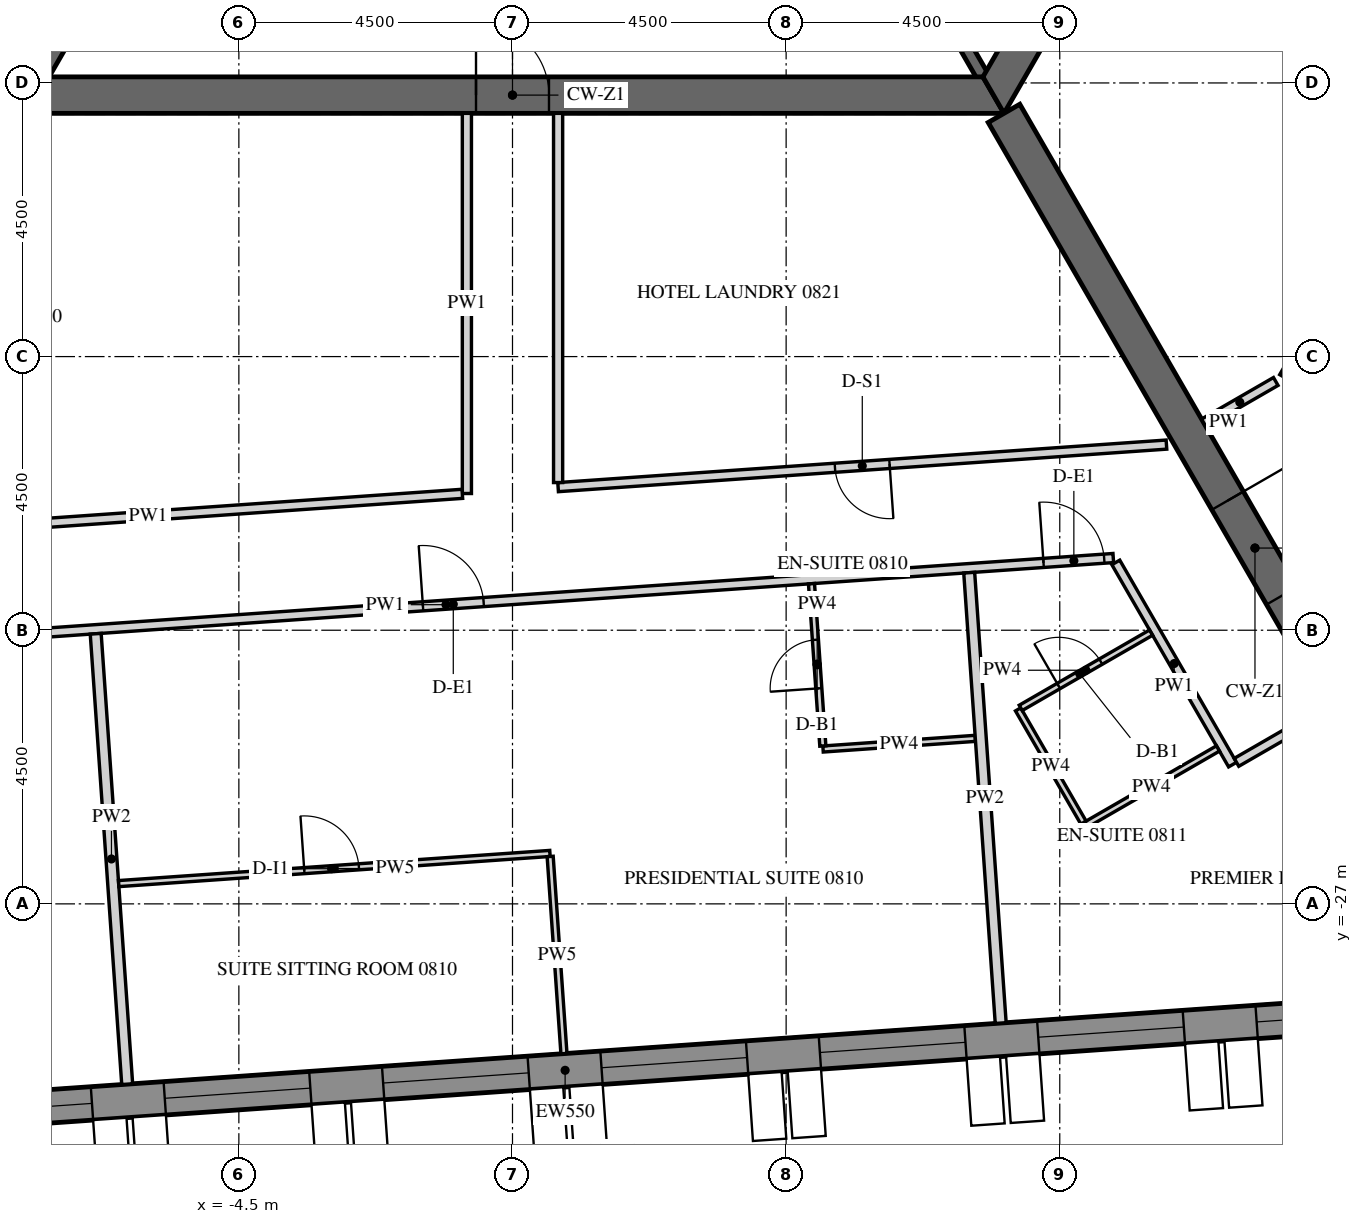
"""IFC4 building model, lengths in metres.
Left out: names, types, materials, properties, quantities, classifications, styles, units other than length and angle.
Written with IfcOpenShell. Run it as: python <this file> out.ifc"""

import sys

from ifc_helpers import new_model, si_unit, direction, frame, frame_2d, origin, place, context, subcontext, project, spatial, polyline, rectangle, outline, extrude, element, fill, save


model = new_model("IFC4")
c1 = context("Model", 3, precision=1e-05, world=origin(), true_north=direction((0.0, 1.0)))
c2 = subcontext(c1, "Body", "Model", "MODEL_VIEW")
j1 = project(units=[si_unit("LENGTHUNIT", "METRE"), si_unit("PLANEANGLEUNIT", "RADIAN")], contexts=[c1])
p1 = place(None, origin())
s1 = spatial("IfcSite", under=j1, at=p1, CompositionType="ELEMENT")
p2 = place(p1, origin())
s2 = spatial("IfcBuilding", under=s1, at=p2, CompositionType="ELEMENT")
p3 = place(p2, frame((0.0, 0.0, 111.6)))
s3 = spatial("IfcBuildingStorey", under=s2, at=p3, CompositionType="ELEMENT", Elevation=111.6)
p4 = place(p3, frame((-14.134, -30.786, -0.15), z_axis=(0.0, 0.0, 1.0), x_axis=(0.997564037441, 0.069756657061, 0.0)))
e1 = element("IfcWall", 1, at=p4, inside=s3, PredefinedType="SOLIDWALL", context=c2, shape_type="SweptSolid", body=[
    extrude(outline(polyline([(-0.026, -0.275), (30.094, -0.275), (30.049, 0.275), (0.026, 0.275), (-0.026, -0.275)])), origin(), (0.0, 0.0, 1.0), 3.9),
])
p5 = place(p4, frame((1.236, 0.0, 1.05)))
e2 = element("IfcOpeningElement", 2, at=p5, cuts=e1, PredefinedType="OPENING", context=c2, shape_type="SweptSolid", body=[
    extrude(rectangle(XDim=2.4, YDim=2.4, at=frame_2d((1.2, 1.2))), frame((0.0, 0.285, 0.0), z_axis=(0.0, -1.0, 0.0), x_axis=(1.0, 0.0, 0.0)), (0.0, 0.0, 1.0), 0.57),
])
p6 = place(p4, frame((4.835, 0.0, 1.05)))
e3 = element("IfcOpeningElement", 3, at=p6, cuts=e1, PredefinedType="OPENING", context=c2, shape_type="SweptSolid", body=[
    extrude(rectangle(XDim=2.4, YDim=2.4, at=frame_2d((1.2, 1.2))), frame((0.0, 0.285, 0.0), z_axis=(0.0, -1.0, 0.0), x_axis=(1.0, 0.0, 0.0)), (0.0, 0.0, 1.0), 0.57),
])
p7 = place(p4, frame((8.436, 0.0, 1.05)))
e4 = element("IfcOpeningElement", 4, at=p7, cuts=e1, PredefinedType="OPENING", context=c2, shape_type="SweptSolid", body=[
    extrude(rectangle(XDim=2.4, YDim=2.4, at=frame_2d((1.2, 1.2))), frame((0.0, 0.285, 0.0), z_axis=(0.0, -1.0, 0.0), x_axis=(1.0, 0.0, 0.0)), (0.0, 0.0, 1.0), 0.57),
])
p8 = place(p4, frame((12.035, 0.0, 1.05)))
e5 = element("IfcOpeningElement", 5, at=p8, cuts=e1, PredefinedType="OPENING", context=c2, shape_type="SweptSolid", body=[
    extrude(rectangle(XDim=2.4, YDim=2.4, at=frame_2d((1.2, 1.2))), frame((0.0, 0.285, 0.0), z_axis=(0.0, -1.0, 0.0), x_axis=(1.0, 0.0, 0.0)), (0.0, 0.0, 1.0), 0.57),
])
p9 = place(p4, frame((15.635, 0.0, 1.05)))
e6 = element("IfcOpeningElement", 6, at=p9, cuts=e1, PredefinedType="OPENING", context=c2, shape_type="SweptSolid", body=[
    extrude(rectangle(XDim=2.4, YDim=2.4, at=frame_2d((1.2, 1.2))), frame((0.0, 0.285, 0.0), z_axis=(0.0, -1.0, 0.0), x_axis=(1.0, 0.0, 0.0)), (0.0, 0.0, 1.0), 0.57),
])
p10 = place(p4, frame((19.236, 0.0, 1.05)))
e7 = element("IfcOpeningElement", 7, at=p10, cuts=e1, PredefinedType="OPENING", context=c2, shape_type="SweptSolid", body=[
    extrude(rectangle(XDim=2.4, YDim=2.4, at=frame_2d((1.2, 1.2))), frame((0.0, 0.285, 0.0), z_axis=(0.0, -1.0, 0.0), x_axis=(1.0, 0.0, 0.0)), (0.0, 0.0, 1.0), 0.57),
])
p11 = place(p4, frame((22.835, 0.0, 1.05)))
e8 = element("IfcOpeningElement", 8, at=p11, cuts=e1, PredefinedType="OPENING", context=c2, shape_type="SweptSolid", body=[
    extrude(rectangle(XDim=2.4, YDim=2.4, at=frame_2d((1.2, 1.2))), frame((0.0, 0.285, 0.0), z_axis=(0.0, -1.0, 0.0), x_axis=(1.0, 0.0, 0.0)), (0.0, 0.0, 1.0), 0.57),
])
p12 = place(p4, frame((26.436, 0.0, 1.05)))
e9 = element("IfcOpeningElement", 9, at=p12, cuts=e1, PredefinedType="OPENING", context=c2, shape_type="SweptSolid", body=[
    extrude(rectangle(XDim=2.4, YDim=2.4, at=frame_2d((1.2, 1.2))), frame((0.0, 0.285, 0.0), z_axis=(0.0, -1.0, 0.0), x_axis=(1.0, 0.0, 0.0)), (0.0, 0.0, 1.0), 0.57),
])
p13 = place(p3, frame((-7.91, -13.7, -0.15), z_axis=(0.0, 0.0, 1.0), x_axis=(1.0, 0.0, 0.0)))
e10 = element("IfcWall", 10, at=p13, inside=s3, PredefinedType="SHEAR", context=c2, shape_type="SweptSolid", body=[
    extrude(outline(polyline([(-0.173, -0.3), (15.993, -0.3), (15.646, 0.3), (0.173, 0.3), (-0.173, -0.3)])), origin(), (0.0, 0.0, 1.0), 3.9),
])
p14 = place(p13, frame((7.31, 0.0, 0.15)))
e11 = element("IfcOpeningElement", 11, at=p14, cuts=e10, PredefinedType="OPENING", context=c2, shape_type="SweptSolid", body=[
    extrude(rectangle(XDim=1.2, YDim=2.4, at=frame_2d((0.6, 1.2))), frame((0.0, 0.31, 0.0), z_axis=(0.0, -1.0, 0.0), x_axis=(1.0, 0.0, 0.0)), (0.0, 0.0, 1.0), 0.62),
])
p15 = place(p3, frame((7.91, -13.7, -0.15), z_axis=(0.0, 0.0, 1.0), x_axis=(0.499999880136, 0.866025472988, 0.0)))
e12 = element("IfcWall", 12, at=p15, inside=s3, PredefinedType="SHEAR", context=c2, shape_type="SweptSolid", body=[
    extrude(outline(polyline([(-0.173, -0.3), (15.993, -0.3), (15.646, 0.3), (0.173, 0.3), (-0.173, -0.3)])), origin(), (0.0, 0.0, 1.0), 3.9),
])
p16 = place(p15, frame((7.039, 0.0, 0.15)))
e13 = element("IfcOpeningElement", 13, at=p16, cuts=e12, PredefinedType="OPENING", context=c2, shape_type="SweptSolid", body=[
    extrude(rectangle(XDim=1.8, YDim=2.4, at=frame_2d((0.9, 1.2))), frame((0.0, 0.31, 0.0), z_axis=(0.0, -1.0, 0.0), x_axis=(1.0, 0.0, 0.0)), (0.0, 0.0, 1.0), 0.62),
])
p17 = place(p3, frame((8.083, -14.0, -0.15), z_axis=(0.0, 0.0, 1.0), x_axis=(0.499997680643, -0.866026742862, 0.0)))
e14 = element("IfcWall", 14, at=p17, inside=s3, PredefinedType="SHEAR", context=c2, shape_type="SweptSolid", body=[
    extrude(rectangle(XDim=16.509, YDim=0.6, at=frame_2d((8.254, 0.0))), origin(), (0.0, 0.0, 1.0), 3.9),
])
p18 = place(p17, frame((7.354, 0.0, 0.15)))
e15 = element("IfcOpeningElement", 15, at=p18, cuts=e14, PredefinedType="OPENING", context=c2, shape_type="SweptSolid", body=[
    extrude(rectangle(XDim=1.8, YDim=2.4, at=frame_2d((0.9, 1.2))), frame((0.0, 0.31, 0.0), z_axis=(0.0, -1.0, 0.0), x_axis=(1.0, 0.0, 0.0)), (0.0, 0.0, 1.0), 0.62),
])
for number, where, z_axis, x_axis in (
    (16, (-5.773, -10.0, -0.15), (0.0, 0.0, 1.0), (-0.5, -0.866, 0.0)),
    (17, (5.773, -10.0, -0.15), (0.0, 0.0, 1.0), (0.5, -0.866, 0.0)),
):
    element("IfcWall", number, at=place(p3, frame(where, z_axis=z_axis, x_axis=x_axis)), inside=s3, PredefinedType="SHEAR", context=c2, shape_type="SweptSolid", body=[
        extrude(rectangle(XDim=3.926, YDim=0.2, at=frame_2d((1.963, 0.0))), origin(), (0.0, 0.0, 1.0), 3.9),
    ])
p19 = place(p3, frame((-12.068, -22.847, 0.0), z_axis=(0.0, 0.0, 1.0), x_axis=(0.99756437486, 0.069751831595, 0.0)))
e18 = element("IfcWall", 18, at=p19, inside=s3, PredefinedType="PARTITIONING", context=c2, shape_type="SweptSolid", body=[
    extrude(rectangle(XDim=22.002, YDim=0.15, at=frame_2d((11.001, 0.0))), origin(), (0.0, 0.0, 1.0), 2.988),
])
p20 = place(p19, frame((10.621, 0.0, 0.0)))
e19 = element("IfcOpeningElement", 19, at=p20, cuts=e18, PredefinedType="OPENING", context=c2, shape_type="SweptSolid", body=[
    extrude(rectangle(XDim=1.0, YDim=2.1, at=frame_2d((0.5, 1.05))), frame((0.0, 0.085, 0.0), z_axis=(0.0, -1.0, 0.0), x_axis=(1.0, 0.0, 0.0)), (0.0, 0.0, 1.0), 0.17),
])
p21 = place(p19, frame((20.852, 0.0, 0.0)))
e20 = element("IfcOpeningElement", 20, at=p21, cuts=e18, PredefinedType="OPENING", context=c2, shape_type="SweptSolid", body=[
    extrude(rectangle(XDim=1.0, YDim=2.1, at=frame_2d((0.5, 1.05))), frame((0.0, 0.085, 0.0), z_axis=(0.0, -1.0, 0.0), x_axis=(1.0, 0.0, 0.0)), (0.0, 0.0, 1.0), 0.17),
])
p22 = place(p3, frame((9.922, -21.385, 0.0), z_axis=(0.0, 0.0, 1.0), x_axis=(0.500023335103, -0.866011930837, 0.0)))
e21 = element("IfcWall", 21, at=p22, inside=s3, PredefinedType="PARTITIONING", context=c2, shape_type="SweptSolid", body=[
    extrude(rectangle(XDim=3.84, YDim=0.15, at=frame_2d((1.92, 0.0))), origin(), (0.0, 0.0, 1.0), 2.988),
])
p23 = place(p3, frame((11.906, -24.673, 0.0), z_axis=(0.0, 0.0, 1.0), x_axis=(0.866013532718, 0.500020560727, 0.0)))
e22 = element("IfcWall", 22, at=p23, inside=s3, PredefinedType="PARTITIONING", context=c2, shape_type="SweptSolid", body=[
    extrude(rectangle(XDim=1.725, YDim=0.15, at=frame_2d((0.863, 0.0))), origin(), (0.0, 0.0, 1.0), 2.988),
])
p24 = place(p3, frame((-0.75, -14.0, 0.0), z_axis=(0.0, 0.0, 1.0), x_axis=(0.0, -1.0, 0.0)))
e23 = element("IfcWall", 23, at=p24, inside=s3, PredefinedType="PARTITIONING", context=c2, shape_type="SweptSolid", body=[
    extrude(rectangle(XDim=6.252, YDim=0.15, at=frame_2d((3.126, 0.0))), origin(), (0.0, 0.0, 1.0), 2.988),
])
p25 = place(p3, frame((-0.825, -20.257, 0.0), z_axis=(0.0, 0.0, 1.0), x_axis=(-0.9975635143, -0.069764137903, 0.0)))
e24 = element("IfcWall", 24, at=p25, inside=s3, PredefinedType="PARTITIONING", context=c2, shape_type="SweptSolid", body=[
    extrude(rectangle(XDim=10.355, YDim=0.15, at=frame_2d((5.177, 0.0))), origin(), (0.0, 0.0, 1.0), 2.988),
])
p26 = place(p3, frame((10.754, -19.447, 0.0), z_axis=(0.0, 0.0, 1.0), x_axis=(-0.997564830966, -0.069745308232, 0.0)))
e25 = element("IfcWall", 25, at=p26, inside=s3, PredefinedType="PARTITIONING", context=c2, shape_type="SweptSolid", body=[
    extrude(rectangle(XDim=10.029, YDim=0.15, at=frame_2d((5.014, 0.0))), origin(), (0.0, 0.0, 1.0), 2.988),
])
p27 = place(p26, frame((4.564, 0.0, 0.0)))
e26 = element("IfcOpeningElement", 26, at=p27, cuts=e25, PredefinedType="OPENING", context=c2, shape_type="SweptSolid", body=[
    extrude(rectangle(XDim=0.9, YDim=2.1, at=frame_2d((0.45, 1.05))), frame((0.0, 0.085, 0.0), z_axis=(0.0, -1.0, 0.0), x_axis=(1.0, 0.0, 0.0)), (0.0, 0.0, 1.0), 0.17),
])
p28 = place(p3, frame((0.75, -20.072, 0.0), z_axis=(0.0, 0.0, 1.0), x_axis=(0.0, 1.0, 0.0)))
e27 = element("IfcWall", 27, at=p28, inside=s3, PredefinedType="PARTITIONING", context=c2, shape_type="SweptSolid", body=[
    extrude(rectangle(XDim=6.072, YDim=0.15, at=frame_2d((3.036, 0.0))), origin(), (0.0, 0.0, 1.0), 2.988),
])
p29 = place(p3, frame((16.902, -11.024, 0.0), z_axis=(0.0, 0.0, 1.0), x_axis=(-0.499999527968, -0.866025676312, 0.0)))
e28 = element("IfcWall", 28, at=p29, inside=s3, PredefinedType="PARTITIONING", context=c2, shape_type="SweptSolid", body=[
    extrude(rectangle(XDim=8.441, YDim=0.15, at=frame_2d((4.22, 0.0))), origin(), (0.0, 0.0, 1.0), 2.988),
])
p30 = place(p29, frame((3.771, 0.0, 0.0)))
e29 = element("IfcOpeningElement", 29, at=p30, cuts=e28, PredefinedType="OPENING", context=c2, shape_type="SweptSolid", body=[
    extrude(rectangle(XDim=0.9, YDim=2.1, at=frame_2d((0.45, 1.05))), frame((0.0, 0.085, 0.0), z_axis=(0.0, -1.0, 0.0), x_axis=(1.0, 0.0, 0.0)), (0.0, 0.0, 1.0), 0.17),
])
p31 = place(p3, frame((12.552, -18.409, 0.0), z_axis=(0.0, 0.0, 1.0), x_axis=(-0.866078408764, -0.499908181442, 0.0)))
e30 = element("IfcWall", 30, at=p31, inside=s3, PredefinedType="PARTITIONING", context=c2, shape_type="SweptSolid", body=[
    extrude(rectangle(XDim=1.365, YDim=0.15, at=frame_2d((0.683, 0.0))), origin(), (0.0, 0.0, 1.0), 2.988),
])
p32 = place(p3, frame((-6.336, -29.965, 0.0), z_axis=(0.0, 0.0, 1.0), x_axis=(-0.06977252161, 0.997562927954, 0.0)))
e31 = element("IfcWall", 31, at=p32, inside=s3, PredefinedType="PARTITIONING", context=c2, shape_type="SweptSolid", body=[
    extrude(rectangle(XDim=7.425, YDim=0.18, at=frame_2d((3.712, 0.0))), origin(), (0.0, 0.0, 1.0), 2.988),
])
p33 = place(p3, frame((7.611, -24.278, 0.0), z_axis=(0.0, 0.0, 1.0), x_axis=(-0.997565196586, -0.069740078583, 0.0)))
e32 = element("IfcWall", 32, at=p33, inside=s3, PredefinedType="PARTITIONING", context=c2, shape_type="SweptSolid", body=[
    extrude(rectangle(XDim=2.51, YDim=0.1, at=frame_2d((1.255, 0.0))), origin(), (0.0, 0.0, 1.0), 2.988),
])
p34 = place(p3, frame((5.104, -24.403, 0.0), z_axis=(0.0, 0.0, 1.0), x_axis=(-0.069729221413, 0.997565955554, 0.0)))
e33 = element("IfcWall", 33, at=p34, inside=s3, PredefinedType="PARTITIONING", context=c2, shape_type="SweptSolid", body=[
    extrude(rectangle(XDim=2.675, YDim=0.1, at=frame_2d((1.337, 0.0))), origin(), (0.0, 0.0, 1.0), 2.988),
])
p35 = place(p34, frame((0.95, 0.0, 0.0)))
e34 = element("IfcOpeningElement", 34, at=p35, cuts=e33, PredefinedType="OPENING", context=c2, shape_type="SweptSolid", body=[
    extrude(rectangle(XDim=0.8, YDim=2.1, at=frame_2d((0.4, 1.05))), frame((0.0, 0.06, 0.0), z_axis=(0.0, -1.0, 0.0), x_axis=(1.0, 0.0, 0.0)), (0.0, 0.0, 1.0), 0.12),
])
p36 = place(p3, frame((-6.477, -26.667, 0.0), z_axis=(0.0, 0.0, 1.0), x_axis=(0.997565277642, 0.069738919141, 0.0)))
e35 = element("IfcWall", 35, at=p36, inside=s3, PredefinedType="PARTITIONING", context=c2, shape_type="SweptSolid", body=[
    extrude(rectangle(XDim=7.11, YDim=0.1, at=frame_2d((3.555, 0.0))), origin(), (0.0, 0.0, 1.0), 2.988),
])
p37 = place(p36, frame((3.06, 0.0, 0.0)))
e36 = element("IfcOpeningElement", 36, at=p37, cuts=e35, PredefinedType="OPENING", context=c2, shape_type="SweptSolid", body=[
    extrude(rectangle(XDim=0.9, YDim=2.1, at=frame_2d((0.45, 1.05))), frame((0.0, 0.06, 0.0), z_axis=(0.0, -1.0, 0.0), x_axis=(1.0, 0.0, 0.0)), (0.0, 0.0, 1.0), 0.12),
])
p38 = place(p3, frame((0.619, -26.221, 0.0), z_axis=(0.0, 0.0, 1.0), x_axis=(0.069789506462, -0.997561739838, 0.0)))
e37 = element("IfcWall", 37, at=p38, inside=s3, PredefinedType="PARTITIONING", context=c2, shape_type="SweptSolid", body=[
    extrude(rectangle(XDim=3.25, YDim=0.1, at=frame_2d((1.625, 0.0))), origin(), (0.0, 0.0, 1.0), 2.988),
])
p39 = place(p3, frame((8.029, -28.96, 0.0), z_axis=(0.0, 0.0, 1.0), x_axis=(-0.069739801019, 0.99756521599, 0.0)))
e38 = element("IfcWall", 38, at=p39, inside=s3, PredefinedType="PARTITIONING", context=c2, shape_type="SweptSolid", body=[
    extrude(rectangle(XDim=7.425, YDim=0.18, at=frame_2d((3.712, 0.0))), origin(), (0.0, 0.0, 1.0), 2.988),
])
p40 = place(p3, frame((11.602, -24.445, 0.0), z_axis=(0.0, 0.0, 1.0), x_axis=(-0.866039067339, -0.499976333282, 0.0)))
e39 = element("IfcWall", 39, at=p40, inside=s3, PredefinedType="PARTITIONING", context=c2, shape_type="SweptSolid", body=[
    extrude(rectangle(XDim=2.525, YDim=0.1, at=frame_2d((1.262, 0.0))), origin(), (0.0, 0.0, 1.0), 2.988),
])
p41 = place(p3, frame((9.39, -25.664, 0.0), z_axis=(0.0, 0.0, 1.0), x_axis=(-0.500010803666, 0.866019166195, 0.0)))
e40 = element("IfcWall", 40, at=p41, inside=s3, PredefinedType="PARTITIONING", context=c2, shape_type="SweptSolid", body=[
    extrude(rectangle(XDim=2.15, YDim=0.1, at=frame_2d((1.075, 0.0))), origin(), (0.0, 0.0, 1.0), 2.988),
])
p42 = place(p3, frame((8.358, -23.777, 0.0), z_axis=(0.0, 0.0, 1.0), x_axis=(0.86604923931, 0.499958713387, 0.0)))
e41 = element("IfcWall", 41, at=p42, inside=s3, PredefinedType="PARTITIONING", context=c2, shape_type="SweptSolid", body=[
    extrude(rectangle(XDim=2.475, YDim=0.1, at=frame_2d((1.237, 0.0))), origin(), (0.0, 0.0, 1.0), 2.988),
])
p43 = place(p42, frame((0.72, 0.0, 0.0)))
e42 = element("IfcOpeningElement", 42, at=p43, cuts=e41, PredefinedType="OPENING", context=c2, shape_type="SweptSolid", body=[
    extrude(rectangle(XDim=0.8, YDim=2.1, at=frame_2d((0.4, 1.05))), frame((0.0, 0.06, 0.0), z_axis=(0.0, -1.0, 0.0), x_axis=(1.0, 0.0, 0.0)), (0.0, 0.0, 1.0), 0.12),
])
p44 = place(p6, frame((0.0, 0.205, 0.0)))
e43 = element("IfcWindow", 43, at=p44, inside=s3, PartitioningType="DOUBLE_PANEL_VERTICAL", PredefinedType="WINDOW", context=c2, shape_type="SweptSolid", body=[
    extrude(rectangle(XDim=2.4, YDim=2.4, at=frame_2d((1.2, 1.2))), frame((0.0, 0.03, 0.0), z_axis=(0.0, -1.0, 0.0), x_axis=(1.0, 0.0, 0.0)), (0.0, 0.0, 1.0), 0.06),
])
fill(e3, e43)
p45 = place(p7, frame((0.0, 0.205, 0.0)))
e44 = element("IfcWindow", 44, at=p45, inside=s3, PartitioningType="DOUBLE_PANEL_VERTICAL", PredefinedType="WINDOW", context=c2, shape_type="SweptSolid", body=[
    extrude(rectangle(XDim=2.4, YDim=2.4, at=frame_2d((1.2, 1.2))), frame((0.0, 0.03, 0.0), z_axis=(0.0, -1.0, 0.0), x_axis=(1.0, 0.0, 0.0)), (0.0, 0.0, 1.0), 0.06),
])
fill(e4, e44)
p46 = place(p8, frame((0.0, 0.205, 0.0)))
e45 = element("IfcWindow", 45, at=p46, inside=s3, PartitioningType="DOUBLE_PANEL_VERTICAL", PredefinedType="WINDOW", context=c2, shape_type="SweptSolid", body=[
    extrude(rectangle(XDim=2.4, YDim=2.4, at=frame_2d((1.2, 1.2))), frame((0.0, 0.03, 0.0), z_axis=(0.0, -1.0, 0.0), x_axis=(1.0, 0.0, 0.0)), (0.0, 0.0, 1.0), 0.06),
])
fill(e5, e45)
p47 = place(p9, frame((0.0, 0.205, 0.0)))
e46 = element("IfcWindow", 46, at=p47, inside=s3, PartitioningType="DOUBLE_PANEL_VERTICAL", PredefinedType="WINDOW", context=c2, shape_type="SweptSolid", body=[
    extrude(rectangle(XDim=2.4, YDim=2.4, at=frame_2d((1.2, 1.2))), frame((0.0, 0.03, 0.0), z_axis=(0.0, -1.0, 0.0), x_axis=(1.0, 0.0, 0.0)), (0.0, 0.0, 1.0), 0.06),
])
fill(e6, e46)
p48 = place(p10, frame((0.0, 0.205, 0.0)))
e47 = element("IfcWindow", 47, at=p48, inside=s3, PartitioningType="DOUBLE_PANEL_VERTICAL", PredefinedType="WINDOW", context=c2, shape_type="SweptSolid", body=[
    extrude(rectangle(XDim=2.4, YDim=2.4, at=frame_2d((1.2, 1.2))), frame((0.0, 0.03, 0.0), z_axis=(0.0, -1.0, 0.0), x_axis=(1.0, 0.0, 0.0)), (0.0, 0.0, 1.0), 0.06),
])
fill(e7, e47)
p49 = place(p11, frame((0.0, 0.205, 0.0)))
e48 = element("IfcWindow", 48, at=p49, inside=s3, PartitioningType="DOUBLE_PANEL_VERTICAL", PredefinedType="WINDOW", context=c2, shape_type="SweptSolid", body=[
    extrude(rectangle(XDim=2.4, YDim=2.4, at=frame_2d((1.2, 1.2))), frame((0.0, 0.03, 0.0), z_axis=(0.0, -1.0, 0.0), x_axis=(1.0, 0.0, 0.0)), (0.0, 0.0, 1.0), 0.06),
])
fill(e8, e48)
p50 = place(p12, frame((0.0, 0.205, 0.0)))
e49 = element("IfcWindow", 49, at=p50, inside=s3, PartitioningType="DOUBLE_PANEL_VERTICAL", PredefinedType="WINDOW", context=c2, shape_type="SweptSolid", body=[
    extrude(rectangle(XDim=2.4, YDim=2.4, at=frame_2d((1.2, 1.2))), frame((0.0, 0.03, 0.0), z_axis=(0.0, -1.0, 0.0), x_axis=(1.0, 0.0, 0.0)), (0.0, 0.0, 1.0), 0.06),
])
fill(e9, e49)
p51 = place(p14, origin())
e50 = element("IfcDoor", 50, at=p51, inside=s3, OperationType="SINGLE_SWING_LEFT", PredefinedType="DOOR", context=c2, shape_type="SweptSolid", body=[
    extrude(rectangle(XDim=1.2, YDim=2.4, at=frame_2d((0.6, 1.2))), frame((0.0, 0.025, 0.0), z_axis=(0.0, -1.0, 0.0), x_axis=(1.0, 0.0, 0.0)), (0.0, 0.0, 1.0), 0.05),
])
fill(e11, e50)
p52 = place(p18, origin())
e51 = element("IfcDoor", 51, at=p52, inside=s3, OperationType="DOUBLE_DOOR_SINGLE_SWING", PredefinedType="DOOR", context=c2, shape_type="SweptSolid", body=[
    extrude(rectangle(XDim=1.8, YDim=2.4, at=frame_2d((0.9, 1.2))), frame((0.0, 0.025, 0.0), z_axis=(0.0, -1.0, 0.0), x_axis=(1.0, 0.0, 0.0)), (0.0, 0.0, 1.0), 0.05),
])
fill(e15, e51)
p53 = place(p20, origin())
e52 = element("IfcDoor", 52, at=p53, inside=s3, OperationType="SINGLE_SWING_RIGHT", PredefinedType="DOOR", context=c2, shape_type="SweptSolid", body=[
    extrude(rectangle(XDim=1.0, YDim=2.1, at=frame_2d((0.5, 1.05))), frame((0.0, 0.025, 0.0), z_axis=(0.0, -1.0, 0.0), x_axis=(1.0, 0.0, 0.0)), (0.0, 0.0, 1.0), 0.05),
])
fill(e19, e52)
p54 = place(p35, origin())
e53 = element("IfcDoor", 53, at=p54, inside=s3, OperationType="SINGLE_SWING_RIGHT", PredefinedType="DOOR", context=c2, shape_type="SweptSolid", body=[
    extrude(rectangle(XDim=0.8, YDim=2.1, at=frame_2d((0.4, 1.05))), frame((0.0, 0.025, 0.0), z_axis=(0.0, -1.0, 0.0), x_axis=(1.0, 0.0, 0.0)), (0.0, 0.0, 1.0), 0.05),
])
fill(e34, e53)
p55 = place(p37, origin())
e54 = element("IfcDoor", 54, at=p55, inside=s3, OperationType="SINGLE_SWING_RIGHT", PredefinedType="DOOR", context=c2, shape_type="SweptSolid", body=[
    extrude(rectangle(XDim=0.9, YDim=2.1, at=frame_2d((0.45, 1.05))), frame((0.0, 0.025, 0.0), z_axis=(0.0, -1.0, 0.0), x_axis=(1.0, 0.0, 0.0)), (0.0, 0.0, 1.0), 0.05),
])
fill(e36, e54)
p56 = place(p21, origin())
e55 = element("IfcDoor", 55, at=p56, inside=s3, OperationType="SINGLE_SWING_LEFT", PredefinedType="DOOR", context=c2, shape_type="SweptSolid", body=[
    extrude(rectangle(XDim=1.0, YDim=2.1, at=frame_2d((0.5, 1.05))), frame((0.0, 0.025, 0.0), z_axis=(0.0, -1.0, 0.0), x_axis=(1.0, 0.0, 0.0)), (0.0, 0.0, 1.0), 0.05),
])
fill(e20, e55)
p57 = place(p43, origin())
e56 = element("IfcDoor", 56, at=p57, inside=s3, OperationType="SINGLE_SWING_RIGHT", PredefinedType="DOOR", context=c2, shape_type="SweptSolid", body=[
    extrude(rectangle(XDim=0.8, YDim=2.1, at=frame_2d((0.4, 1.05))), frame((0.0, 0.025, 0.0), z_axis=(0.0, -1.0, 0.0), x_axis=(1.0, 0.0, 0.0)), (0.0, 0.0, 1.0), 0.05),
])
fill(e42, e56)
p58 = place(p27, origin())
e57 = element("IfcDoor", 57, at=p58, inside=s3, OperationType="SINGLE_SWING_LEFT", PredefinedType="DOOR", context=c2, shape_type="SweptSolid", body=[
    extrude(rectangle(XDim=0.9, YDim=2.1, at=frame_2d((0.45, 1.05))), frame((0.0, 0.025, 0.0), z_axis=(0.0, -1.0, 0.0), x_axis=(1.0, 0.0, 0.0)), (0.0, 0.0, 1.0), 0.05),
])
fill(e26, e57)
save(model, sys.argv[1])
